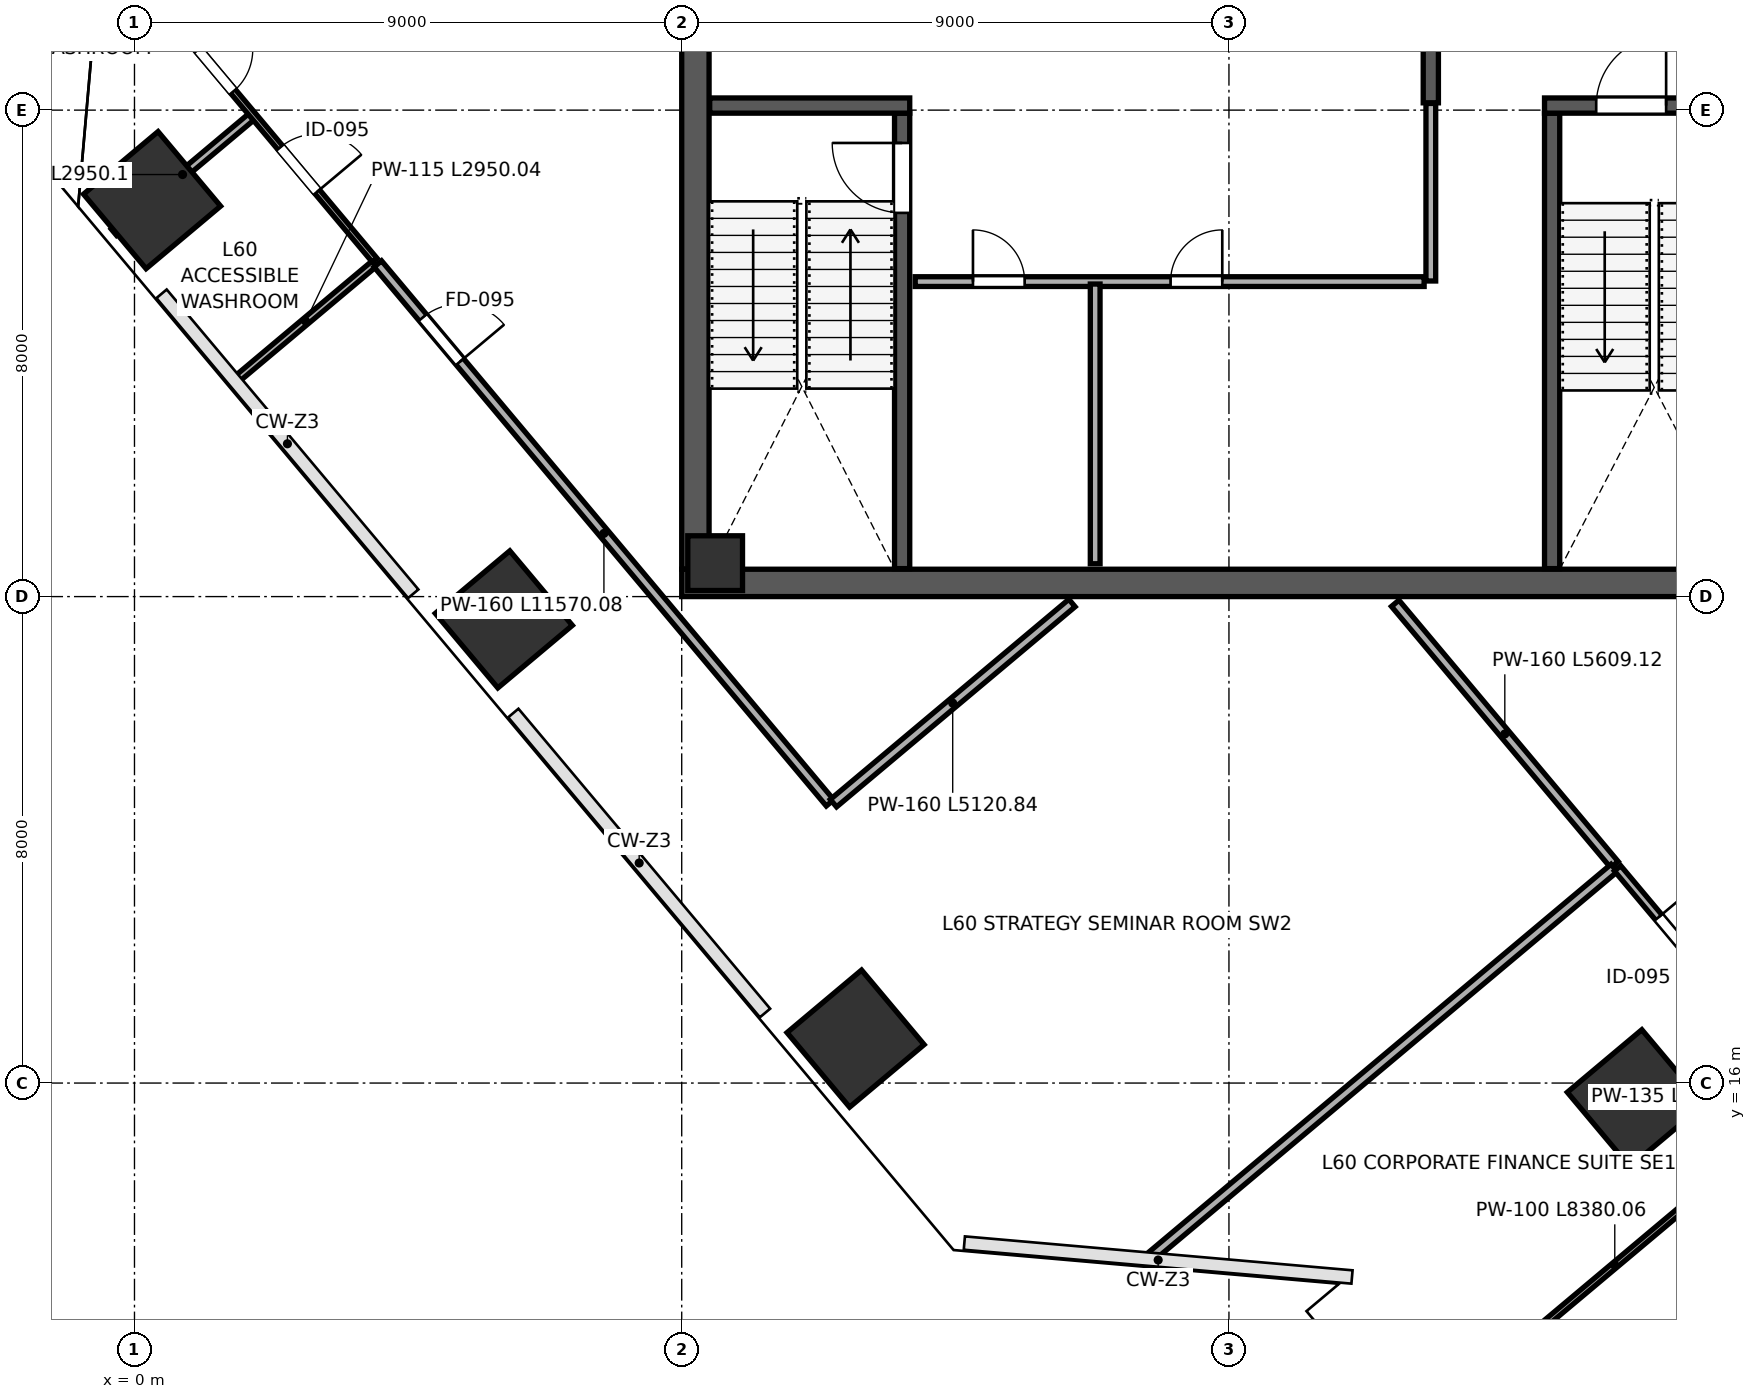
"""IFC4 building model, lengths in metres.
Left out: names, types, materials, properties, quantities, classifications, styles, units other than length and angle.
Written with IfcOpenShell. Run it as: python <this file> out.ifc"""

import sys

from ifc_helpers import new_model, si_unit, direction, frame, frame_2d, origin, origin_2d, place, context, subcontext, project, spatial, rectangle, extrude, source, transform, mapped, element, fill, save


model = new_model("IFC4")
c1 = context("Model", 3, precision=1e-05, world=origin(), true_north=direction((0.0, 1.0)))
c2 = subcontext(c1, "Body", "Model", "MODEL_VIEW")
j1 = project(units=[si_unit("LENGTHUNIT", "METRE"), si_unit("PLANEANGLEUNIT", "RADIAN")], contexts=[c1])
p1 = place(None, origin())
s1 = spatial("IfcSite", under=j1, at=p1, CompositionType="ELEMENT")
p2 = place(p1, origin())
s2 = spatial("IfcBuilding", under=s1, at=p2, CompositionType="ELEMENT")
p3 = place(p2, frame((0.0, 0.0, 266.8)))
s3 = spatial("IfcBuildingStorey", under=s2, at=p3, CompositionType="ELEMENT", Elevation=266.8)
m1 = source(origin(), c2, "Body", "SweptSolid", [
    extrude(rectangle(XDim=0.9, YDim=0.9, at=origin_2d()), origin(), (0.0, 0.0, 1.0), 4.198),
])
p4 = place(p3, frame((9.55, 24.55, 0.001), z_axis=(0.0, 0.0, 1.0), x_axis=(1.0, 0.0, 0.0)))
e1 = element("IfcColumn", 1, at=p4, inside=s3, PredefinedType="COLUMN", context=c2, shape_type="MappedRepresentation", body=[
    mapped(m1, transform((0.0, 0.0, 0.0), scale=1.0)),
])
m2 = source(origin(), c2, "Body", "SweptSolid", [
    extrude(rectangle(XDim=1.6, YDim=1.6, at=origin_2d()), origin(), (0.0, 0.0, 1.0), 4.198),
])
for number, where, z_axis, x_axis in (
    (2, (0.289, 30.52, 0.001), (0.0, 0.0, 1.0), (-0.643, 0.766, 0.0)),
    (3, (6.074, 23.625, 0.001), (0.0, 0.0, 1.0), (-0.643, 0.766, 0.0)),
    (4, (11.859, 16.731, 0.001), (0.0, 0.0, 1.0), (-0.643, 0.766, 0.0)),
):
    element("IfcColumn", number, at=place(p3, frame(where, z_axis=z_axis, x_axis=x_axis)), inside=s3, PredefinedType="COLUMN", context=c2, shape_type="MappedRepresentation", body=[
        mapped(m2, transform((0.0, 0.0, 0.0), scale=1.0)),
    ])
m3 = source(origin(), c2, "Body", "SweptSolid", [
    extrude(rectangle(XDim=1.6, YDim=1.6, at=origin_2d()), origin(), (0.0, 0.0, 1.0), 4.198),
])
p5 = place(p3, frame((24.692, 15.75, 0.001), z_axis=(0.0, 0.0, 1.0), x_axis=(-0.642787609687, 0.766044443119, 0.0)))
e5 = element("IfcColumn", 5, at=p5, inside=s3, PredefinedType="COLUMN", context=c2, shape_type="MappedRepresentation", body=[
    mapped(m3, transform((0.0, 0.0, 0.0), scale=1.0)),
])
p6 = place(p3, frame((9.225, 24.45, 0.0), z_axis=(0.0, 0.0, 1.0), x_axis=(0.0, 1.0, 0.0)))
e6 = element("IfcWall", 6, at=p6, inside=s3, PredefinedType="SHEAR", context=c2, shape_type="SweptSolid", body=[
    extrude(rectangle(XDim=15.1, YDim=0.45, at=frame_2d((7.55, 0.0))), origin(), (0.0, 0.0, 1.0), 3.96),
])
p7 = place(p6, frame((8.7, 0.0, 0.0)))
e7 = element("IfcOpeningElement", 7, at=p7, cuts=e6, PredefinedType="OPENING", context=c2, shape_type="SweptSolid", body=[
    extrude(rectangle(XDim=1.15, YDim=2.2, at=frame_2d((0.575, 1.1))), frame((0.0, 0.235, 0.0), z_axis=(0.0, -1.0, 0.0), x_axis=(1.0, 0.0, 0.0)), (0.0, 0.0, 1.0), 0.47),
])
p8 = place(p3, frame((9.0, 24.225, 0.0), z_axis=(0.0, 0.0, 1.0), x_axis=(1.0, 0.0, 0.0)))
e8 = element("IfcWall", 8, at=p8, inside=s3, PredefinedType="SHEAR", context=c2, shape_type="SweptSolid", body=[
    extrude(rectangle(XDim=18.0, YDim=0.45, at=frame_2d((9.0, 0.0))), origin(), (0.0, 0.0, 1.0), 3.96),
])
p9 = place(p3, frame((12.625, 24.46, 0.0), z_axis=(0.0, 0.0, 1.0), x_axis=(0.0, 1.0, 0.0)))
e9 = element("IfcWall", 9, at=p9, inside=s3, PredefinedType="SHEAR", context=c2, shape_type="SweptSolid", body=[
    extrude(rectangle(XDim=7.49, YDim=0.25, at=frame_2d((3.745, 0.0))), origin(), (0.0, 0.0, 1.0), 3.96),
])
p10 = place(p9, frame((5.85, 0.0, 0.0)))
e10 = element("IfcOpeningElement", 10, at=p10, cuts=e9, PredefinedType="OPENING", context=c2, shape_type="SweptSolid", body=[
    extrude(rectangle(XDim=1.15, YDim=2.2, at=frame_2d((0.575, 1.1))), frame((0.0, 0.135, 0.0), z_axis=(0.0, -1.0, 0.0), x_axis=(1.0, 0.0, 0.0)), (0.0, 0.0, 1.0), 0.27),
])
p11 = place(p3, frame((9.46, 32.075, 0.0), z_axis=(0.0, 0.0, 1.0), x_axis=(1.0, 0.0, 0.0)))
e11 = element("IfcWall", 11, at=p11, inside=s3, PredefinedType="SHEAR", context=c2, shape_type="SweptSolid", body=[
    extrude(rectangle(XDim=3.29, YDim=0.25, at=frame_2d((1.645, 0.0))), origin(), (0.0, 0.0, 1.0), 3.96),
])
p12 = place(p3, frame((23.315, 24.46, 0.0), z_axis=(0.0, 0.0, 1.0), x_axis=(0.0, 1.0, 0.0)))
e12 = element("IfcWall", 12, at=p12, inside=s3, PredefinedType="SHEAR", context=c2, shape_type="SweptSolid", body=[
    extrude(rectangle(XDim=7.49, YDim=0.25, at=frame_2d((3.745, 0.0))), origin(), (0.0, 0.0, 1.0), 3.96),
])
p13 = place(p3, frame((23.19, 32.075, 0.0), z_axis=(0.0, 0.0, 1.0), x_axis=(1.0, 0.0, 0.0)))
e13 = element("IfcWall", 13, at=p13, inside=s3, PredefinedType="SHEAR", context=c2, shape_type="SweptSolid", body=[
    extrude(rectangle(XDim=3.35, YDim=0.25, at=frame_2d((1.675, 0.0))), origin(), (0.0, 0.0, 1.0), 3.96),
])
p14 = place(p13, frame((0.85, 0.0, 0.0)))
e14 = element("IfcOpeningElement", 14, at=p14, cuts=e13, PredefinedType="OPENING", context=c2, shape_type="SweptSolid", body=[
    extrude(rectangle(XDim=1.15, YDim=2.2, at=frame_2d((0.575, 1.1))), frame((0.0, 0.135, 0.0), z_axis=(0.0, -1.0, 0.0), x_axis=(1.0, 0.0, 0.0)), (0.0, 0.0, 1.0), 0.27),
])
p15 = place(p3, frame((21.32, 32.12, 0.0), z_axis=(0.0, 0.0, 1.0), x_axis=(0.0, 1.0, 0.0)))
e15 = element("IfcWall", 15, at=p15, inside=s3, PredefinedType="SHEAR", context=c2, shape_type="SweptSolid", body=[
    extrude(rectangle(XDim=7.42, YDim=0.25, at=frame_2d((3.71, 0.0))), origin(), (0.0, 0.0, 1.0), 3.96),
])
p16 = place(p15, frame((1.4, 0.0, 0.0)))
e16 = element("IfcOpeningElement", 16, at=p16, cuts=e15, PredefinedType="OPENING", context=c2, shape_type="SweptSolid", body=[
    extrude(rectangle(XDim=1.15, YDim=2.2, at=frame_2d((0.575, 1.1))), frame((0.0, 0.135, 0.0), z_axis=(0.0, -1.0, 0.0), x_axis=(1.0, 0.0, 0.0)), (0.0, 0.0, 1.0), 0.27),
])
p17 = place(p3, frame((12.84, 29.18, 0.0), z_axis=(0.0, 0.0, 1.0), x_axis=(1.0, 0.0, 0.0)))
e17 = element("IfcWall", 17, at=p17, inside=s3, PredefinedType="PARTITIONING", context=c2, shape_type="SweptSolid", body=[
    extrude(rectangle(XDim=8.37, YDim=0.16, at=frame_2d((4.185, 0.0))), origin(), (0.0, 0.0, 1.0), 3.96),
])
p18 = place(p17, frame((0.95, 0.0, 0.0)))
e18 = element("IfcOpeningElement", 18, at=p18, cuts=e17, PredefinedType="OPENING", context=c2, shape_type="SweptSolid", body=[
    extrude(rectangle(XDim=0.85, YDim=2.1, at=frame_2d((0.425, 1.05))), frame((0.0, 0.09, 0.0), z_axis=(0.0, -1.0, 0.0), x_axis=(1.0, 0.0, 0.0)), (0.0, 0.0, 1.0), 0.18),
])
p19 = place(p17, frame((4.2, 0.0, 0.0)))
e19 = element("IfcOpeningElement", 19, at=p19, cuts=e17, PredefinedType="OPENING", context=c2, shape_type="SweptSolid", body=[
    extrude(rectangle(XDim=0.85, YDim=2.1, at=frame_2d((0.425, 1.05))), frame((0.0, 0.09, 0.0), z_axis=(0.0, -1.0, 0.0), x_axis=(1.0, 0.0, 0.0)), (0.0, 0.0, 1.0), 0.18),
])
p20 = place(p3, frame((15.8, 24.54, 0.0), z_axis=(0.0, 0.0, 1.0), x_axis=(0.0, 1.0, 0.0)))
e20 = element("IfcWall", 20, at=p20, inside=s3, PredefinedType="PARTITIONING", context=c2, shape_type="SweptSolid", body=[
    extrude(rectangle(XDim=4.6, YDim=0.16, at=frame_2d((2.3, 0.0))), origin(), (0.0, 0.0, 1.0), 3.96),
])
p21 = place(p3, frame((21.32, 29.19, 0.0), z_axis=(0.0, 0.0, 1.0), x_axis=(0.0, 1.0, 0.0)))
e21 = element("IfcWall", 21, at=p21, inside=s3, PredefinedType="PARTITIONING", context=c2, shape_type="SweptSolid", body=[
    extrude(rectangle(XDim=2.92, YDim=0.16, at=frame_2d((1.46, 0.0))), origin(), (0.0, 0.0, 1.0), 3.96),
])
p22 = place(p3, frame((-0.339, 29.992, 0.0), z_axis=(0.0, 0.0, 1.0), x_axis=(0.766025914603, 0.642809690465, 0.0)))
e22 = element("IfcWall", 22, at=p22, inside=s3, PredefinedType="PARTITIONING", context=c2, shape_type="SweptSolid", body=[
    extrude(rectangle(XDim=2.95, YDim=0.135, at=frame_2d((1.475, 0.0))), origin(), (0.0, 0.0, 1.0), 3.195),
])
p23 = place(p3, frame((1.686, 27.58, 0.0), z_axis=(0.0, 0.0, 1.0), x_axis=(0.766107411761, 0.642712559116, 0.0)))
e23 = element("IfcWall", 23, at=p23, inside=s3, PredefinedType="PARTITIONING", context=c2, shape_type="SweptSolid", body=[
    extrude(rectangle(XDim=2.95, YDim=0.115, at=frame_2d((1.475, 0.0))), origin(), (0.0, 0.0, 1.0), 3.195),
])
p24 = place(p3, frame((-0.819, 35.216, 0.0), z_axis=(0.0, 0.0, 1.0), x_axis=(0.642772999209, -0.766056702528, 0.0)))
e24 = element("IfcWall", 24, at=p24, inside=s3, PredefinedType="PARTITIONING", context=c2, shape_type="SweptSolid", body=[
    extrude(rectangle(XDim=7.42, YDim=0.1, at=frame_2d((3.71, 0.0))), origin(), (0.0, 0.0, 1.0), 3.96),
])
p25 = place(p24, frame((2.9, 0.0, 0.0)))
e25 = element("IfcOpeningElement", 25, at=p25, cuts=e24, PredefinedType="OPENING", context=c2, shape_type="SweptSolid", body=[
    extrude(rectangle(XDim=0.9, YDim=2.15, at=frame_2d((0.45, 1.075))), frame((0.0, 0.06, 0.0), z_axis=(0.0, -1.0, 0.0), x_axis=(1.0, 0.0, 0.0)), (0.0, 0.0, 1.0), 0.12),
])
p26 = place(p24, frame((5.0, 0.0, 0.0)))
e26 = element("IfcOpeningElement", 26, at=p26, cuts=e24, PredefinedType="OPENING", context=c2, shape_type="SweptSolid", body=[
    extrude(rectangle(XDim=0.95, YDim=2.15, at=frame_2d((0.475, 1.075))), frame((0.0, 0.06, 0.0), z_axis=(0.0, -1.0, 0.0), x_axis=(1.0, 0.0, 0.0)), (0.0, 0.0, 1.0), 0.12),
])
p27 = place(p3, frame((4.002, 29.471, 0.0), z_axis=(0.0, 0.0, 1.0), x_axis=(0.642802048813, -0.766032327021, 0.0)))
e27 = element("IfcWall", 27, at=p27, inside=s3, PredefinedType="PARTITIONING", context=c2, shape_type="SweptSolid", body=[
    extrude(rectangle(XDim=11.57, YDim=0.16, at=frame_2d((5.785, 0.0))), origin(), (0.0, 0.0, 1.0), 3.96),
])
p28 = place(p27, frame((1.15, 0.0, 0.0)))
e28 = element("IfcOpeningElement", 28, at=p28, cuts=e27, PredefinedType="OPENING", context=c2, shape_type="SweptSolid", body=[
    extrude(rectangle(XDim=0.95, YDim=2.15, at=frame_2d((0.475, 1.075))), frame((0.0, 0.09, 0.0), z_axis=(0.0, -1.0, 0.0), x_axis=(1.0, 0.0, 0.0)), (0.0, 0.0, 1.0), 0.18),
])
p29 = place(p3, frame((11.495, 20.603, 0.0), z_axis=(0.0, 0.0, 1.0), x_axis=(0.766059769702, 0.642769343734, 0.0)))
e29 = element("IfcWall", 29, at=p29, inside=s3, PredefinedType="PARTITIONING", context=c2, shape_type="SweptSolid", body=[
    extrude(rectangle(XDim=5.121, YDim=0.16, at=frame_2d((2.561, 0.0))), origin(), (0.0, 0.0, 1.0), 3.96),
])
p30 = place(p3, frame((20.734, 23.889, 0.0), z_axis=(0.0, 0.0, 1.0), x_axis=(0.642758145725, -0.766069165353, 0.0)))
e30 = element("IfcWall", 30, at=p30, inside=s3, PredefinedType="PARTITIONING", context=c2, shape_type="SweptSolid", body=[
    extrude(rectangle(XDim=5.609, YDim=0.16, at=frame_2d((2.804, 0.0))), origin(), (0.0, 0.0, 1.0), 3.96),
])
p31 = place(p3, frame((19.528, 51.245, 0.0), z_axis=(0.0, 0.0, 1.0), x_axis=(0.642782364439, -0.766048844374, 0.0)))
e31 = element("IfcWall", 31, at=p31, inside=s3, PredefinedType="PARTITIONING", context=c2, shape_type="SweptSolid", body=[
    extrude(rectangle(XDim=27.34, YDim=0.135, at=frame_2d((13.67, 0.0))), origin(), (0.0, 0.0, 1.0), 3.96),
])
p32 = place(p31, frame((10.8, 0.0, 0.0)))
e32 = element("IfcOpeningElement", 32, at=p32, cuts=e31, PredefinedType="OPENING", context=c2, shape_type="SweptSolid", body=[
    extrude(rectangle(XDim=0.95, YDim=2.15, at=frame_2d((0.475, 1.075))), frame((0.0, 0.078, 0.0), z_axis=(0.0, -1.0, 0.0), x_axis=(1.0, 0.0, 0.0)), (0.0, 0.0, 1.0), 0.155),
])
p33 = place(p3, frame((16.711, 13.139, 0.0), z_axis=(0.0, 0.0, 1.0), x_axis=(0.766041122188, 0.642791567398, 0.0)))
e33 = element("IfcWall", 33, at=p33, inside=s3, PredefinedType="PARTITIONING", context=c2, shape_type="SweptSolid", body=[
    extrude(rectangle(XDim=9.952, YDim=0.16, at=frame_2d((4.976, 0.0))), origin(), (0.0, 0.0, 1.0), 3.96),
])
p34 = place(p3, frame((24.391, 19.531, 0.0), z_axis=(0.0, 0.0, 1.0), x_axis=(0.642797456481, -0.76603618057, 0.0)))
e34 = element("IfcWall", 34, at=p34, inside=s3, PredefinedType="PARTITIONING", context=c2, shape_type="SweptSolid", body=[
    extrude(rectangle(XDim=9.81, YDim=0.135, at=frame_2d((4.905, 0.0))), origin(), (0.0, 0.0, 1.0), 3.96),
])
p35 = place(p34, frame((1.05, 0.0, 0.0)))
e35 = element("IfcOpeningElement", 35, at=p35, cuts=e34, PredefinedType="OPENING", context=c2, shape_type="SweptSolid", body=[
    extrude(rectangle(XDim=0.95, YDim=2.15, at=frame_2d((0.475, 1.075))), frame((0.0, 0.078, 0.0), z_axis=(0.0, -1.0, 0.0), x_axis=(1.0, 0.0, 0.0)), (0.0, 0.0, 1.0), 0.155),
])
p36 = place(p34, frame((6.46, 0.0, 0.0)))
e36 = element("IfcOpeningElement", 36, at=p36, cuts=e34, PredefinedType="OPENING", context=c2, shape_type="SweptSolid", body=[
    extrude(rectangle(XDim=0.95, YDim=2.15, at=frame_2d((0.475, 1.075))), frame((0.0, 0.078, 0.0), z_axis=(0.0, -1.0, 0.0), x_axis=(1.0, 0.0, 0.0)), (0.0, 0.0, 1.0), 0.155),
])
p37 = place(p3, frame((21.136, 10.312, 0.0), z_axis=(0.0, 0.0, 1.0), x_axis=(0.766048541695, 0.642782725162, 0.0)))
e37 = element("IfcWall", 37, at=p37, inside=s3, PredefinedType="PARTITIONING", context=c2, shape_type="SweptSolid", body=[
    extrude(rectangle(XDim=8.38, YDim=0.1, at=frame_2d((4.19, 0.0))), origin(), (0.0, 0.0, 1.0), 3.96),
])
m4 = source(origin(), c2, "Body", "SweptSolid", [
    extrude(rectangle(XDim=1.15, YDim=2.2, at=frame_2d((0.575, 1.1))), frame((0.0, 0.025, 0.0), z_axis=(0.0, -1.0, 0.0), x_axis=(1.0, 0.0, 0.0)), (0.0, 0.0, 1.0), 0.05),
])
p38 = place(p10, origin())
e38 = element("IfcDoor", 38, at=p38, inside=s3, OperationType="SINGLE_SWING_RIGHT", PredefinedType="DOOR", context=c2, shape_type="MappedRepresentation", body=[
    mapped(m4, transform((0.0, 0.0, 0.0), scale=1.0)),
])
fill(e10, e38)
p39 = place(p14, origin())
e39 = element("IfcDoor", 39, at=p39, inside=s3, OperationType="SINGLE_SWING_RIGHT", PredefinedType="DOOR", context=c2, shape_type="MappedRepresentation", body=[
    mapped(m4, transform((0.0, 0.0, 0.0), scale=1.0)),
])
fill(e14, e39)
m5 = source(origin(), c2, "Body", "SweptSolid", [
    extrude(rectangle(XDim=0.85, YDim=2.1, at=frame_2d((0.425, 1.05))), frame((0.0, 0.025, 0.0), z_axis=(0.0, -1.0, 0.0), x_axis=(1.0, 0.0, 0.0)), (0.0, 0.0, 1.0), 0.05),
])
p40 = place(p18, origin())
e40 = element("IfcDoor", 40, at=p40, inside=s3, OperationType="SINGLE_SWING_LEFT", PredefinedType="DOOR", context=c2, shape_type="MappedRepresentation", body=[
    mapped(m5, transform((0.0, 0.0, 0.0), scale=1.0)),
])
fill(e18, e40)
p41 = place(p19, origin())
e41 = element("IfcDoor", 41, at=p41, inside=s3, OperationType="SINGLE_SWING_RIGHT", PredefinedType="DOOR", context=c2, shape_type="MappedRepresentation", body=[
    mapped(m5, transform((0.0, 0.0, 0.0), scale=1.0)),
])
fill(e19, e41)
m6 = source(origin(), c2, "Body", "SweptSolid", [
    extrude(rectangle(XDim=0.9, YDim=2.15, at=frame_2d((0.45, 1.075))), frame((0.0, 0.025, 0.0), z_axis=(0.0, -1.0, 0.0), x_axis=(1.0, 0.0, 0.0)), (0.0, 0.0, 1.0), 0.05),
])
p42 = place(p25, origin())
e42 = element("IfcDoor", 42, at=p42, inside=s3, OperationType="SINGLE_SWING_LEFT", PredefinedType="DOOR", context=c2, shape_type="MappedRepresentation", body=[
    mapped(m6, transform((0.0, 0.0, 0.0), scale=1.0)),
])
fill(e25, e42)
m7 = source(origin(), c2, "Body", "SweptSolid", [
    extrude(rectangle(XDim=0.95, YDim=2.15, at=frame_2d((0.475, 1.075))), frame((0.0, 0.025, 0.0), z_axis=(0.0, -1.0, 0.0), x_axis=(1.0, 0.0, 0.0)), (0.0, 0.0, 1.0), 0.05),
])
p43 = place(p26, origin())
e43 = element("IfcDoor", 43, at=p43, inside=s3, OperationType="SINGLE_SWING_RIGHT", PredefinedType="DOOR", context=c2, shape_type="MappedRepresentation", body=[
    mapped(m7, transform((0.0, 0.0, 0.0), scale=1.0)),
])
fill(e26, e43)
m8 = source(origin(), c2, "Body", "SweptSolid", [
    extrude(rectangle(XDim=0.95, YDim=2.15, at=frame_2d((0.475, 1.075))), frame((0.0, 0.025, 0.0), z_axis=(0.0, -1.0, 0.0), x_axis=(1.0, 0.0, 0.0)), (0.0, 0.0, 1.0), 0.05),
])
p44 = place(p28, origin())
e44 = element("IfcDoor", 44, at=p44, inside=s3, OperationType="SINGLE_SWING_RIGHT", PredefinedType="DOOR", context=c2, shape_type="MappedRepresentation", body=[
    mapped(m8, transform((0.0, 0.0, 0.0), scale=1.0)),
])
fill(e28, e44)
p45 = place(p35, origin())
e45 = element("IfcDoor", 45, at=p45, inside=s3, OperationType="SINGLE_SWING_LEFT", PredefinedType="DOOR", context=c2, shape_type="MappedRepresentation", body=[
    mapped(m7, transform((0.0, 0.0, 0.0), scale=1.0)),
])
fill(e35, e45)
save(model, sys.argv[1])
